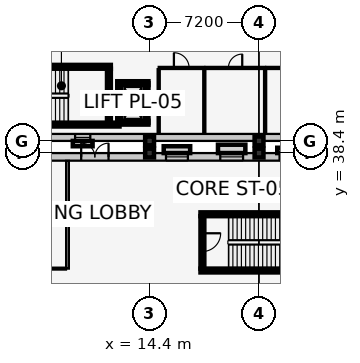
"""IFC4 building model, lengths in metres.
Left out: names, types, materials, properties, quantities, classifications, styles, units other than length and angle.
Written with IfcOpenShell. Run it as: python <this file> out.ifc"""

import sys

from ifc_helpers import new_model, si_unit, direction, frame, frame_2d, origin, origin_2d, place, context, subcontext, project, spatial, rectangle, extrude, element, fill, save


model = new_model("IFC4")
c1 = context("Model", 3, precision=1e-05, world=origin(), true_north=direction((0.0, 1.0)))
c2 = subcontext(c1, "Body", "Model", "MODEL_VIEW")
j1 = project(units=[si_unit("LENGTHUNIT", "METRE"), si_unit("PLANEANGLEUNIT", "RADIAN")], contexts=[c1])
p1 = place(None, origin())
s1 = spatial("IfcSite", under=j1, at=p1, CompositionType="ELEMENT")
p2 = place(p1, origin())
s2 = spatial("IfcBuilding", under=s1, at=p2, CompositionType="ELEMENT")
p3 = place(p2, origin())
s3 = spatial("IfcBuildingStorey", under=s2, at=p3, CompositionType="ELEMENT", Elevation=0.0)
for number, where, z_axis, x_axis in (
    (1, (14.4, 38.4, 0.0), (0.0, 0.0, 1.0), (1.0, 0.0, 0.0)),
    (2, (21.6, 38.4, 0.0), (0.0, 0.0, 1.0), (1.0, 0.0, 0.0)),
    (3, (14.4, 39.2, 0.0), (0.0, 0.0, 1.0), (1.0, 0.0, 0.0)),
    (4, (21.6, 39.2, 0.0), (0.0, 0.0, 1.0), (1.0, 0.0, 0.0)),
):
    element("IfcColumn", number, at=place(p3, frame(where, z_axis=z_axis, x_axis=x_axis)), inside=s3, PredefinedType="COLUMN", context=c2, shape_type="SweptSolid", body=[
        extrude(rectangle(XDim=0.58, YDim=0.58, at=origin_2d()), origin(), (0.0, 0.0, 1.0), 5.4),
    ])
p4 = place(p3, frame((0.0, 38.15, 0.0), z_axis=(0.0, 0.0, 1.0), x_axis=(1.0, 0.0, 0.0)))
e5 = element("IfcWall", 5, at=p4, inside=s3, PredefinedType="SOLIDWALL", context=c2, shape_type="SweptSolid", body=[
    extrude(rectangle(XDim=57.6, YDim=0.5, at=frame_2d((28.8, 0.0))), origin(), (0.0, 0.0, 1.0), 4.395),
])
p5 = place(p4, frame((9.9, 0.0, 0.0)))
e6 = element("IfcOpeningElement", 6, at=p5, cuts=e5, PredefinedType="OPENING", context=c2, shape_type="SweptSolid", body=[
    extrude(rectangle(XDim=1.8, YDim=2.3, at=frame_2d((0.9, 1.15))), frame((0.0, 0.262, 0.0), z_axis=(0.0, -1.0, 0.0), x_axis=(1.0, 0.0, 0.0)), (0.0, 0.0, 1.0), 0.524),
])
p6 = place(p4, frame((1.3, 0.0, 0.9)))
e7 = element("IfcOpeningElement", 7, at=p6, cuts=e5, PredefinedType="OPENING", context=c2, shape_type="SweptSolid", body=[
    extrude(rectangle(XDim=1.0, YDim=1.75, at=frame_2d((0.5, 0.875))), frame((0.0, 0.262, 0.0), z_axis=(0.0, -1.0, 0.0), x_axis=(1.0, 0.0, 0.0)), (0.0, 0.0, 1.0), 0.524),
])
p7 = place(p4, frame((4.84, 0.0, 0.9)))
e8 = element("IfcOpeningElement", 8, at=p7, cuts=e5, PredefinedType="OPENING", context=c2, shape_type="SweptSolid", body=[
    extrude(rectangle(XDim=1.12, YDim=1.75, at=frame_2d((0.56, 0.875))), frame((0.0, 0.262, 0.0), z_axis=(0.0, -1.0, 0.0), x_axis=(1.0, 0.0, 0.0)), (0.0, 0.0, 1.0), 0.524),
])
p8 = place(p4, frame((15.48, 0.0, 0.9)))
e9 = element("IfcOpeningElement", 9, at=p8, cuts=e5, PredefinedType="OPENING", context=c2, shape_type="SweptSolid", body=[
    extrude(rectangle(XDim=1.44, YDim=1.75, at=frame_2d((0.72, 0.875))), frame((0.0, 0.262, 0.0), z_axis=(0.0, -1.0, 0.0), x_axis=(1.0, 0.0, 0.0)), (0.0, 0.0, 1.0), 0.524),
])
p9 = place(p4, frame((19.05, 0.0, 0.9)))
e10 = element("IfcOpeningElement", 10, at=p9, cuts=e5, PredefinedType="OPENING", context=c2, shape_type="SweptSolid", body=[
    extrude(rectangle(XDim=1.5, YDim=1.75, at=frame_2d((0.75, 0.875))), frame((0.0, 0.262, 0.0), z_axis=(0.0, -1.0, 0.0), x_axis=(1.0, 0.0, 0.0)), (0.0, 0.0, 1.0), 0.524),
])
p10 = place(p4, frame((22.95, 0.0, 0.9)))
e11 = element("IfcOpeningElement", 11, at=p10, cuts=e5, PredefinedType="OPENING", context=c2, shape_type="SweptSolid", body=[
    extrude(rectangle(XDim=0.9, YDim=1.35, at=frame_2d((0.45, 0.675))), frame((0.0, 0.262, 0.0), z_axis=(0.0, -1.0, 0.0), x_axis=(1.0, 0.0, 0.0)), (0.0, 0.0, 1.0), 0.524),
])
p11 = place(p4, frame((30.05, 0.0, 0.9)))
e12 = element("IfcOpeningElement", 12, at=p11, cuts=e5, PredefinedType="OPENING", context=c2, shape_type="SweptSolid", body=[
    extrude(rectangle(XDim=1.1, YDim=1.35, at=frame_2d((0.55, 0.675))), frame((0.0, 0.262, 0.0), z_axis=(0.0, -1.0, 0.0), x_axis=(1.0, 0.0, 0.0)), (0.0, 0.0, 1.0), 0.524),
])
p12 = place(p4, frame((33.6, 0.0, 0.9)))
e13 = element("IfcOpeningElement", 13, at=p12, cuts=e5, PredefinedType="OPENING", context=c2, shape_type="SweptSolid", body=[
    extrude(rectangle(XDim=1.2, YDim=1.35, at=frame_2d((0.6, 0.675))), frame((0.0, 0.262, 0.0), z_axis=(0.0, -1.0, 0.0), x_axis=(1.0, 0.0, 0.0)), (0.0, 0.0, 1.0), 0.524),
])
p13 = place(p4, frame((51.625, 0.0, 0.9)))
e14 = element("IfcOpeningElement", 14, at=p13, cuts=e5, PredefinedType="OPENING", context=c2, shape_type="SweptSolid", body=[
    extrude(rectangle(XDim=1.15, YDim=1.45, at=frame_2d((0.575, 0.725))), frame((0.0, 0.262, 0.0), z_axis=(0.0, -1.0, 0.0), x_axis=(1.0, 0.0, 0.0)), (0.0, 0.0, 1.0), 0.524),
])
p14 = place(p4, frame((55.175, 0.0, 0.9)))
e15 = element("IfcOpeningElement", 15, at=p14, cuts=e5, PredefinedType="OPENING", context=c2, shape_type="SweptSolid", body=[
    extrude(rectangle(XDim=1.25, YDim=1.45, at=frame_2d((0.625, 0.725))), frame((0.0, 0.262, 0.0), z_axis=(0.0, -1.0, 0.0), x_axis=(1.0, 0.0, 0.0)), (0.0, 0.0, 1.0), 0.524),
])
p15 = place(p3, frame((36.0, 39.43, 0.0), z_axis=(0.0, 0.0, 1.0), x_axis=(-1.0, 0.0, 0.0)))
e16 = element("IfcWall", 16, at=p15, inside=s3, PredefinedType="SOLIDWALL", context=c2, shape_type="SweptSolid", body=[
    extrude(rectangle(XDim=36.0, YDim=0.46, at=frame_2d((18.0, 0.0))), origin(), (0.0, 0.0, 1.0), 4.435),
])
p16 = place(p15, frame((1.55, 0.0, 0.9)))
e17 = element("IfcOpeningElement", 17, at=p16, cuts=e16, PredefinedType="OPENING", context=c2, shape_type="SweptSolid", body=[
    extrude(rectangle(XDim=0.9, YDim=1.6, at=frame_2d((0.45, 0.8))), frame((0.0, 0.242, 0.0), z_axis=(0.0, -1.0, 0.0), x_axis=(1.0, 0.0, 0.0)), (0.0, 0.0, 1.0), 0.484),
])
p17 = place(p15, frame((25.5, 0.0, 0.9)))
e18 = element("IfcOpeningElement", 18, at=p17, cuts=e16, PredefinedType="OPENING", context=c2, shape_type="SweptSolid", body=[
    extrude(rectangle(XDim=1.0, YDim=1.75, at=frame_2d((0.5, 0.875))), frame((0.0, 0.242, 0.0), z_axis=(0.0, -1.0, 0.0), x_axis=(1.0, 0.0, 0.0)), (0.0, 0.0, 1.0), 0.484),
])
p18 = place(p15, frame((33.38, 0.0, 0.9)))
e19 = element("IfcOpeningElement", 19, at=p18, cuts=e16, PredefinedType="OPENING", context=c2, shape_type="SweptSolid", body=[
    extrude(rectangle(XDim=1.24, YDim=1.75, at=frame_2d((0.62, 0.875))), frame((0.0, 0.242, 0.0), z_axis=(0.0, -1.0, 0.0), x_axis=(1.0, 0.0, 0.0)), (0.0, 0.0, 1.0), 0.484),
])
p19 = place(p3, frame((2.95, 40.275, 0.0), z_axis=(0.0, 0.0, 1.0), x_axis=(1.0, 0.0, 0.0)))
e20 = element("IfcWall", 20, at=p19, inside=s3, PredefinedType="SHEAR", context=c2, shape_type="SweptSolid", body=[
    extrude(rectangle(XDim=9.47, YDim=0.25, at=frame_2d((4.735, 0.0))), origin(), (0.0, 0.0, 1.0), 5.14),
])
p20 = place(p3, frame((11.85, 44.075, 0.0), z_axis=(0.0, 0.0, 1.0), x_axis=(-1.0, 0.0, 0.0)))
e21 = element("IfcWall", 21, at=p20, inside=s3, PredefinedType="SHEAR", context=c2, shape_type="SweptSolid", body=[
    extrude(rectangle(XDim=8.9, YDim=0.25, at=frame_2d((4.45, 0.0))), origin(), (0.0, 0.0, 1.0), 5.14),
])
p21 = place(p3, frame((11.725, 40.4, 0.0), z_axis=(0.0, 0.0, 1.0), x_axis=(0.0, 1.0, 0.0)))
e22 = element("IfcWall", 22, at=p21, inside=s3, PredefinedType="SHEAR", context=c2, shape_type="SweptSolid", body=[
    extrude(rectangle(XDim=3.55, YDim=0.25, at=frame_2d((1.775, 0.0))), origin(), (0.0, 0.0, 1.0), 5.14),
])
for number, where, z_axis, x_axis in (
    (23, (17.75, 30.675, 0.0), (0.0, 0.0, 1.0), (1.0, 0.0, 0.0)),
    (24, (26.65, 34.375, 0.0), (0.0, 0.0, 1.0), (-1.0, 0.0, 0.0)),
):
    element("IfcWall", number, at=place(p3, frame(where, z_axis=z_axis, x_axis=x_axis)), inside=s3, PredefinedType="SHEAR", context=c2, shape_type="SweptSolid", body=[
        extrude(rectangle(XDim=8.9, YDim=0.25, at=frame_2d((4.45, 0.0))), origin(), (0.0, 0.0, 1.0), 5.1),
    ])
p22 = place(p3, frame((17.875, 34.25, 0.0), z_axis=(0.0, 0.0, 1.0), x_axis=(0.0, -1.0, 0.0)))
e25 = element("IfcWall", 25, at=p22, inside=s3, PredefinedType="SHEAR", context=c2, shape_type="SweptSolid", body=[
    extrude(rectangle(XDim=3.45, YDim=0.25, at=frame_2d((1.725, 0.0))), origin(), (0.0, 0.0, 1.0), 5.1),
])
p23 = place(p22, frame((1.125, 0.0, 0.0)))
e26 = element("IfcOpeningElement", 26, at=p23, cuts=e25, PredefinedType="OPENING", context=c2, shape_type="SweptSolid", body=[
    extrude(rectangle(XDim=1.2, YDim=2.15, at=frame_2d((0.6, 1.075))), frame((0.0, 0.137, 0.0), z_axis=(0.0, -1.0, 0.0), x_axis=(1.0, 0.0, 0.0)), (0.0, 0.0, 1.0), 0.274),
])
p24 = place(p3, frame((12.275, 40.4, 0.0), z_axis=(0.0, 0.0, 1.0), x_axis=(1.0, 0.0, 0.0)))
e27 = element("IfcWall", 27, at=p24, inside=s3, PredefinedType="SHEAR", context=c2, shape_type="SweptSolid", body=[
    extrude(rectangle(XDim=2.05, YDim=0.25, at=frame_2d((1.025, 0.0))), origin(), (0.0, 0.0, 1.0), 5.14),
])
p25 = place(p3, frame((14.325, 43.0, 0.0), z_axis=(0.0, 0.0, 1.0), x_axis=(-1.0, 0.0, 0.0)))
e28 = element("IfcWall", 28, at=p25, inside=s3, PredefinedType="SHEAR", context=c2, shape_type="SweptSolid", body=[
    extrude(rectangle(XDim=2.05, YDim=0.25, at=frame_2d((1.025, 0.0))), origin(), (0.0, 0.0, 1.0), 5.14),
])
p26 = place(p25, frame((0.55, 0.0, 0.0)))
e29 = element("IfcOpeningElement", 29, at=p26, cuts=e28, PredefinedType="OPENING", context=c2, shape_type="SweptSolid", body=[
    extrude(rectangle(XDim=0.95, YDim=2.1, at=frame_2d((0.475, 1.05))), frame((0.0, 0.137, 0.0), z_axis=(0.0, -1.0, 0.0), x_axis=(1.0, 0.0, 0.0)), (0.0, 0.0, 1.0), 0.274),
])
for number, where, z_axis, x_axis in (
    (30, (12.4, 43.0, 0.0), (0.0, 0.0, 1.0), (0.0, -1.0, 0.0)),
    (31, (14.2, 40.4, 0.0), (0.0, 0.0, 1.0), (0.0, 1.0, 0.0)),
):
    element("IfcWall", number, at=place(p3, frame(where, z_axis=z_axis, x_axis=x_axis)), inside=s3, PredefinedType="SHEAR", context=c2, shape_type="SweptSolid", body=[
        extrude(rectangle(XDim=2.6, YDim=0.25, at=frame_2d((1.3, 0.0))), origin(), (0.0, 0.0, 1.0), 5.14),
    ])
p27 = place(p3, frame((9.0, 30.8, 0.0), z_axis=(0.0, 0.0, 1.0), x_axis=(0.0, 1.0, 0.0)))
e32 = element("IfcWall", 32, at=p27, inside=s3, PredefinedType="PARTITIONING", context=c2, shape_type="SweptSolid", body=[
    extrude(rectangle(XDim=7.09, YDim=0.18, at=frame_2d((3.545, 0.0))), origin(), (0.0, 0.0, 1.0), 5.1),
])
p28 = place(p3, frame((0.51, 30.8, 0.0), z_axis=(0.0, 0.0, 1.0), x_axis=(1.0, 0.0, 0.0)))
e33 = element("IfcWall", 33, at=p28, inside=s3, PredefinedType="PARTITIONING", context=c2, shape_type="SweptSolid", body=[
    extrude(rectangle(XDim=8.39, YDim=0.125, at=frame_2d((4.195, 0.0))), origin(), (0.0, 0.0, 1.0), 5.1),
])
p29 = place(p28, frame((3.635, 0.0, 0.0)))
e34 = element("IfcOpeningElement", 34, at=p29, cuts=e33, PredefinedType="OPENING", context=c2, shape_type="SweptSolid", body=[
    extrude(rectangle(XDim=1.12, YDim=2.15, at=frame_2d((0.56, 1.075))), frame((0.0, 0.074, 0.0), z_axis=(0.0, -1.0, 0.0), x_axis=(1.0, 0.0, 0.0)), (0.0, 0.0, 1.0), 0.149),
])
p30 = place(p3, frame((15.0, 44.0, 0.0), z_axis=(0.0, 0.0, 1.0), x_axis=(1.0, 0.0, 0.0)))
e35 = element("IfcWall", 35, at=p30, inside=s3, PredefinedType="PARTITIONING", context=c2, shape_type="SweptSolid", body=[
    extrude(rectangle(XDim=3.0, YDim=0.14, at=frame_2d((1.5, 0.0))), origin(), (0.0, 0.0, 1.0), 5.14),
])
p31 = place(p30, frame((1.0, 0.0, 0.0)))
e36 = element("IfcOpeningElement", 36, at=p31, cuts=e35, PredefinedType="OPENING", context=c2, shape_type="SweptSolid", body=[
    extrude(rectangle(XDim=1.0, YDim=2.1, at=frame_2d((0.5, 1.05))), frame((0.0, 0.082, 0.0), z_axis=(0.0, -1.0, 0.0), x_axis=(1.0, 0.0, 0.0)), (0.0, 0.0, 1.0), 0.164),
])
p32 = place(p3, frame((15.0, 39.67, 0.0), z_axis=(0.0, 0.0, 1.0), x_axis=(0.0, 1.0, 0.0)))
e37 = element("IfcWall", 37, at=p32, inside=s3, PredefinedType="PARTITIONING", context=c2, shape_type="SweptSolid", body=[
    extrude(rectangle(XDim=4.25, YDim=0.14, at=frame_2d((2.125, 0.0))), origin(), (0.0, 0.0, 1.0), 5.14),
])
p33 = place(p3, frame((18.0, 39.67, 0.0), z_axis=(0.0, 0.0, 1.0), x_axis=(0.0, 1.0, 0.0)))
e38 = element("IfcWall", 38, at=p33, inside=s3, PredefinedType="PARTITIONING", context=c2, shape_type="SweptSolid", body=[
    extrude(rectangle(XDim=4.25, YDim=0.14, at=frame_2d((2.125, 0.0))), origin(), (0.0, 0.0, 1.0), 4.665),
])
p34 = place(p3, frame((18.08, 44.0, 0.0), z_axis=(0.0, 0.0, 1.0), x_axis=(1.0, 0.0, 0.0)))
e39 = element("IfcWall", 39, at=p34, inside=s3, PredefinedType="PARTITIONING", context=c2, shape_type="SweptSolid", body=[
    extrude(rectangle(XDim=3.92, YDim=0.14, at=frame_2d((1.96, 0.0))), origin(), (0.0, 0.0, 1.0), 5.14),
])
p35 = place(p34, frame((1.505, 0.0, 0.0)))
e40 = element("IfcOpeningElement", 40, at=p35, cuts=e39, PredefinedType="OPENING", context=c2, shape_type="SweptSolid", body=[
    extrude(rectangle(XDim=0.91, YDim=2.06, at=frame_2d((0.455, 1.03))), frame((0.0, 0.082, 0.0), z_axis=(0.0, -1.0, 0.0), x_axis=(1.0, 0.0, 0.0)), (0.0, 0.0, 1.0), 0.164),
])
p36 = place(p3, frame((22.0, 39.67, 0.0), z_axis=(0.0, 0.0, 1.0), x_axis=(0.0, 1.0, 0.0)))
e41 = element("IfcWall", 41, at=p36, inside=s3, PredefinedType="PARTITIONING", context=c2, shape_type="SweptSolid", body=[
    extrude(rectangle(XDim=4.25, YDim=0.14, at=frame_2d((2.125, 0.0))), origin(), (0.0, 0.0, 1.0), 5.14),
])
p37 = place(p3, frame((22.08, 44.0, 0.0), z_axis=(0.0, 0.0, 1.0), x_axis=(1.0, 0.0, 0.0)))
e42 = element("IfcWall", 42, at=p37, inside=s3, PredefinedType="PARTITIONING", context=c2, shape_type="SweptSolid", body=[
    extrude(rectangle(XDim=3.92, YDim=0.14, at=frame_2d((1.96, 0.0))), origin(), (0.0, 0.0, 1.0), 5.14),
])
p38 = place(p37, frame((1.515, 0.0, 0.0)))
e43 = element("IfcOpeningElement", 43, at=p38, cuts=e42, PredefinedType="OPENING", context=c2, shape_type="SweptSolid", body=[
    extrude(rectangle(XDim=0.89, YDim=2.05, at=frame_2d((0.445, 1.025))), frame((0.0, 0.082, 0.0), z_axis=(0.0, -1.0, 0.0), x_axis=(1.0, 0.0, 0.0)), (0.0, 0.0, 1.0), 0.164),
])
p39 = place(p5, origin())
e44 = element("IfcDoor", 44, at=p39, inside=s3, OperationType="DOUBLE_DOOR_SINGLE_SWING", PredefinedType="DOOR", context=c2, shape_type="SweptSolid", body=[
    extrude(rectangle(XDim=1.8, YDim=2.3, at=frame_2d((0.9, 1.15))), frame((0.0, 0.025, 0.0), z_axis=(0.0, -1.0, 0.0), x_axis=(1.0, 0.0, 0.0)), (0.0, 0.0, 1.0), 0.05),
])
fill(e6, e44)
p40 = place(p8, origin())
e45 = element("IfcWindow", 45, at=p40, inside=s3, PartitioningType="SINGLE_PANEL", PredefinedType="WINDOW", context=c2, shape_type="SweptSolid", body=[
    extrude(rectangle(XDim=1.44, YDim=1.75, at=frame_2d((0.72, 0.875))), frame((0.0, 0.03, 0.0), z_axis=(0.0, -1.0, 0.0), x_axis=(1.0, 0.0, 0.0)), (0.0, 0.0, 1.0), 0.06),
])
fill(e9, e45)
p41 = place(p9, origin())
e46 = element("IfcWindow", 46, at=p41, inside=s3, PartitioningType="SINGLE_PANEL", PredefinedType="WINDOW", context=c2, shape_type="SweptSolid", body=[
    extrude(rectangle(XDim=1.5, YDim=1.75, at=frame_2d((0.75, 0.875))), frame((0.0, 0.03, 0.0), z_axis=(0.0, -1.0, 0.0), x_axis=(1.0, 0.0, 0.0)), (0.0, 0.0, 1.0), 0.06),
])
fill(e10, e46)
p42 = place(p10, origin())
e47 = element("IfcWindow", 47, at=p42, inside=s3, PartitioningType="SINGLE_PANEL", PredefinedType="WINDOW", context=c2, shape_type="SweptSolid", body=[
    extrude(rectangle(XDim=0.9, YDim=1.35, at=frame_2d((0.45, 0.675))), frame((0.0, 0.03, 0.0), z_axis=(0.0, -1.0, 0.0), x_axis=(1.0, 0.0, 0.0)), (0.0, 0.0, 1.0), 0.06),
])
fill(e11, e47)
p43 = place(p17, origin())
e48 = element("IfcWindow", 48, at=p43, inside=s3, PartitioningType="SINGLE_PANEL", PredefinedType="WINDOW", context=c2, shape_type="SweptSolid", body=[
    extrude(rectangle(XDim=1.0, YDim=1.75, at=frame_2d((0.5, 0.875))), frame((0.0, 0.03, 0.0), z_axis=(0.0, -1.0, 0.0), x_axis=(1.0, 0.0, 0.0)), (0.0, 0.0, 1.0), 0.06),
])
fill(e18, e48)
p44 = place(p23, origin())
e49 = element("IfcDoor", 49, at=p44, inside=s3, OperationType="SINGLE_SWING_LEFT", PredefinedType="DOOR", context=c2, shape_type="SweptSolid", body=[
    extrude(rectangle(XDim=1.2, YDim=2.15, at=frame_2d((0.6, 1.075))), frame((0.0, 0.025, 0.0), z_axis=(0.0, -1.0, 0.0), x_axis=(1.0, 0.0, 0.0)), (0.0, 0.0, 1.0), 0.05),
])
fill(e26, e49)
p45 = place(p26, origin())
e50 = element("IfcDoor", 50, at=p45, inside=s3, OperationType="SLIDING_TO_LEFT", PredefinedType="DOOR", context=c2, shape_type="SweptSolid", body=[
    extrude(rectangle(XDim=0.95, YDim=2.1, at=frame_2d((0.475, 1.05))), frame((0.0, 0.025, 0.0), z_axis=(0.0, -1.0, 0.0), x_axis=(1.0, 0.0, 0.0)), (0.0, 0.0, 1.0), 0.05),
])
fill(e29, e50)
p46 = place(p31, origin())
e51 = element("IfcDoor", 51, at=p46, inside=s3, OperationType="SINGLE_SWING_LEFT", PredefinedType="DOOR", context=c2, shape_type="SweptSolid", body=[
    extrude(rectangle(XDim=1.0, YDim=2.1, at=frame_2d((0.5, 1.05))), frame((0.0, 0.025, 0.0), z_axis=(0.0, -1.0, 0.0), x_axis=(1.0, 0.0, 0.0)), (0.0, 0.0, 1.0), 0.05),
])
fill(e36, e51)
p47 = place(p35, origin())
e52 = element("IfcDoor", 52, at=p47, inside=s3, OperationType="SINGLE_SWING_RIGHT", PredefinedType="DOOR", context=c2, shape_type="SweptSolid", body=[
    extrude(rectangle(XDim=0.91, YDim=2.06, at=frame_2d((0.455, 1.03))), frame((0.0, 0.025, 0.0), z_axis=(0.0, -1.0, 0.0), x_axis=(1.0, 0.0, 0.0)), (0.0, 0.0, 1.0), 0.05),
])
fill(e40, e52)
save(model, sys.argv[1])
